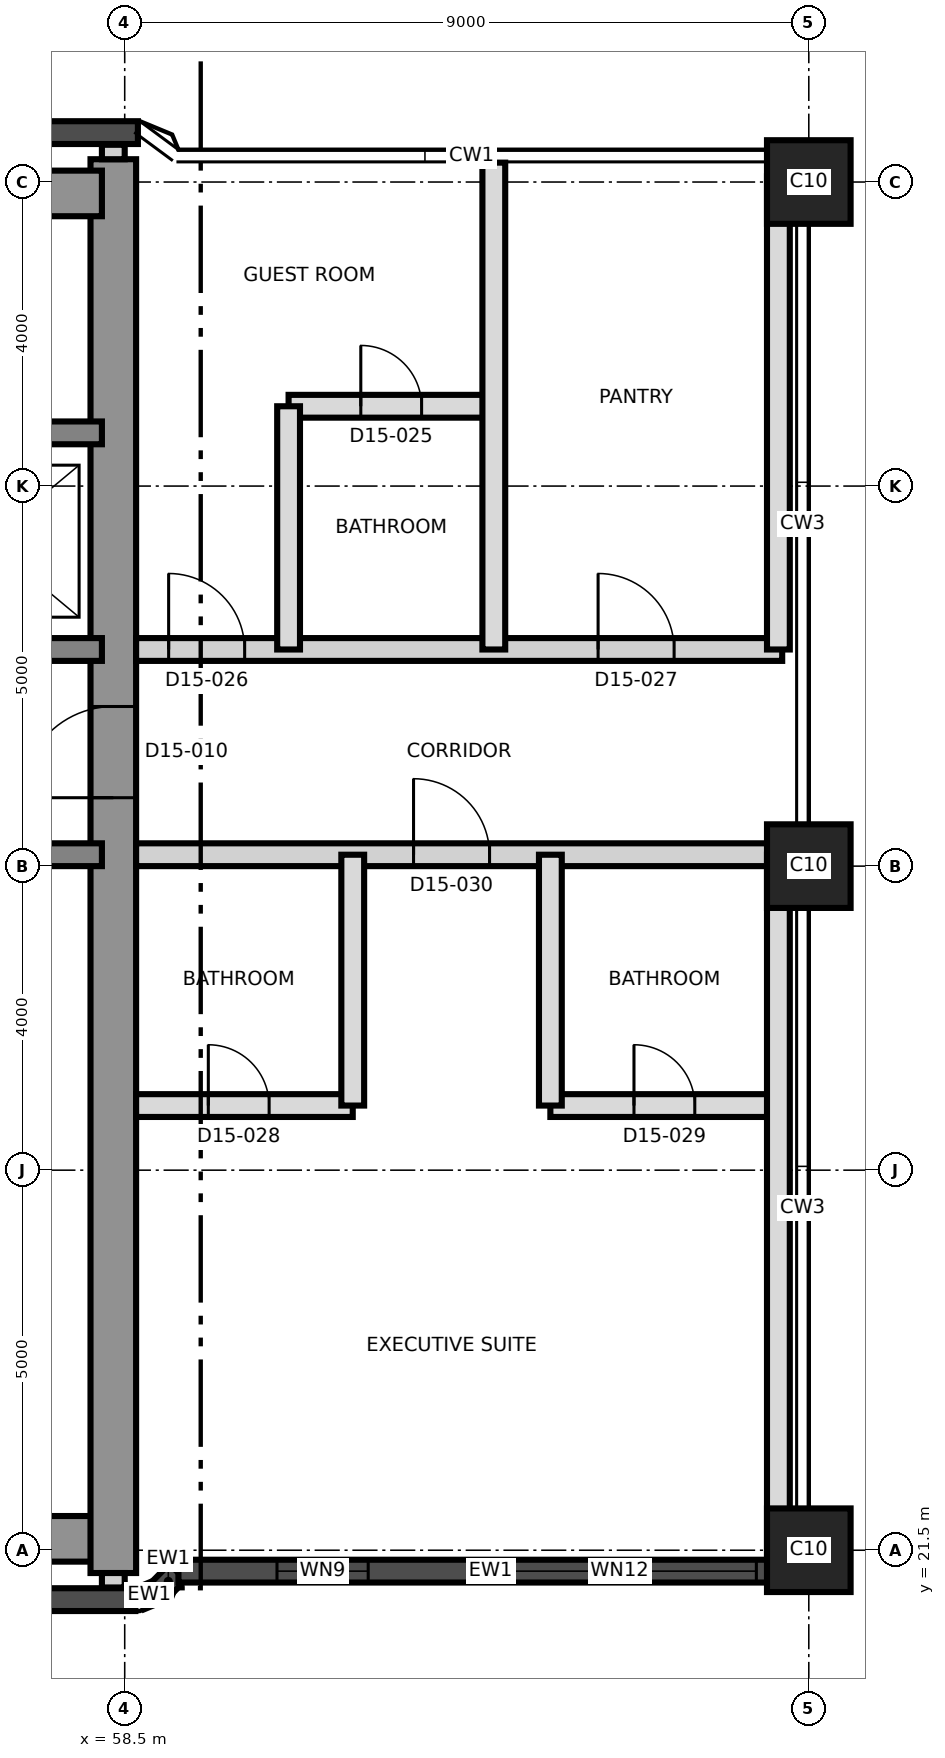
"""IFC4 building model, lengths in metres.
Left out: names, types, materials, properties, quantities, classifications, styles, units other than length and angle.
Written with IfcOpenShell. Run it as: python <this file> out.ifc"""

import sys

from ifc_helpers import new_model, si_unit, direction, frame, frame_2d, origin, origin_2d, place, context, subcontext, project, spatial, rectangle, extrude, element, fill, save


model = new_model("IFC4")
c1 = context("Model", 3, precision=1e-05, world=origin(), true_north=direction((0.0, 1.0)))
c2 = subcontext(c1, "Body", "Model", "MODEL_VIEW")
j1 = project(units=[si_unit("LENGTHUNIT", "METRE"), si_unit("PLANEANGLEUNIT", "RADIAN")], contexts=[c1])
p1 = place(None, origin())
s1 = spatial("IfcSite", under=j1, at=p1, CompositionType="ELEMENT")
p2 = place(p1, origin())
s2 = spatial("IfcBuilding", under=s1, at=p2, CompositionType="ELEMENT")
p3 = place(p2, frame((0.0, 0.0, 157.0)))
s3 = spatial("IfcBuildingStorey", under=s2, at=p3, CompositionType="ELEMENT", Elevation=157.0)
p4 = place(p3, frame((31.2, 21.65, 0.0), z_axis=(0.0, 0.0, 1.0), x_axis=(1.0, 0.0, 0.0)))
e1 = element("IfcWall", 1, at=p4, inside=s3, PredefinedType="SHEAR", context=c2, shape_type="SweptSolid", body=[
    extrude(rectangle(XDim=27.0, YDim=0.6, at=frame_2d((13.5, 0.0))), origin(), (0.0, 0.0, 1.0), 3.7),
])
p5 = place(p3, frame((58.35, 21.2, 0.0), z_axis=(0.0, 0.0, 1.0), x_axis=(0.0, 1.0, 0.0)))
e2 = element("IfcWall", 2, at=p5, inside=s3, PredefinedType="SHEAR", context=c2, shape_type="SweptSolid", body=[
    extrude(rectangle(XDim=18.6, YDim=0.6, at=frame_2d((9.3, 0.0))), origin(), (0.0, 0.0, 1.0), 3.7),
])
p6 = place(p5, frame((10.2, 0.0, 0.0)))
e3 = element("IfcOpeningElement", 3, at=p6, cuts=e2, PredefinedType="OPENING", context=c2, shape_type="SweptSolid", body=[
    extrude(rectangle(XDim=1.2, YDim=2.1, at=frame_2d((0.6, 1.05))), frame((0.0, 0.31, 0.0), z_axis=(0.0, -1.0, 0.0), x_axis=(1.0, 0.0, 0.0)), (0.0, 0.0, 1.0), 0.62),
])
p7 = place(p3, frame((31.2, 39.35, 0.0), z_axis=(0.0, 0.0, 1.0), x_axis=(1.0, 0.0, 0.0)))
e4 = element("IfcWall", 4, at=p7, inside=s3, PredefinedType="SHEAR", context=c2, shape_type="SweptSolid", body=[
    extrude(rectangle(XDim=27.0, YDim=0.6, at=frame_2d((13.5, 0.0))), origin(), (0.0, 0.0, 1.0), 3.7),
])
p8 = place(p7, frame((10.5, 0.0, 0.0)))
e5 = element("IfcOpeningElement", 5, at=p8, cuts=e4, PredefinedType="OPENING", context=c2, shape_type="SweptSolid", body=[
    extrude(rectangle(XDim=1.2, YDim=2.1, at=frame_2d((0.6, 1.05))), frame((0.0, 0.31, 0.0), z_axis=(0.0, -1.0, 0.0), x_axis=(1.0, 0.0, 0.0)), (0.0, 0.0, 1.0), 0.62),
])
p9 = place(p3, frame((31.8, 30.65, 0.0), z_axis=(0.0, 0.0, 1.0), x_axis=(1.0, 0.0, 0.0)))
e6 = element("IfcWall", 6, at=p9, inside=s3, PredefinedType="SHEAR", context=c2, shape_type="SweptSolid", body=[
    extrude(rectangle(XDim=26.4, YDim=0.3, at=frame_2d((13.2, 0.0))), origin(), (0.0, 0.0, 1.0), 3.7),
])
p10 = place(p9, frame((24.7, 0.0, 0.0)))
e7 = element("IfcOpeningElement", 7, at=p10, cuts=e6, PredefinedType="OPENING", context=c2, shape_type="SweptSolid", body=[
    extrude(rectangle(XDim=1.0, YDim=2.1, at=frame_2d((0.5, 1.05))), frame((0.0, 0.16, 0.0), z_axis=(0.0, -1.0, 0.0), x_axis=(1.0, 0.0, 0.0)), (0.0, 0.0, 1.0), 0.32),
])
p11 = place(p3, frame((31.8, 33.35, 0.0), z_axis=(0.0, 0.0, 1.0), x_axis=(1.0, 0.0, 0.0)))
e8 = element("IfcWall", 8, at=p11, inside=s3, PredefinedType="SHEAR", context=c2, shape_type="SweptSolid", body=[
    extrude(rectangle(XDim=26.4, YDim=0.3, at=frame_2d((13.2, 0.0))), origin(), (0.0, 0.0, 1.0), 3.7),
])
p12 = place(p11, frame((13.85, 0.0, 0.0)))
e9 = element("IfcOpeningElement", 9, at=p12, cuts=e8, PredefinedType="OPENING", context=c2, shape_type="SweptSolid", body=[
    extrude(rectangle(XDim=1.4, YDim=2.1, at=frame_2d((0.7, 1.05))), frame((0.0, 0.16, 0.0), z_axis=(0.0, -1.0, 0.0), x_axis=(1.0, 0.0, 0.0)), (0.0, 0.0, 1.0), 0.32),
])
p13 = place(p11, frame((5.325, 0.0, 0.0)))
e10 = element("IfcOpeningElement", 10, at=p13, cuts=e8, PredefinedType="OPENING", context=c2, shape_type="SweptSolid", body=[
    extrude(rectangle(XDim=1.2, YDim=2.1, at=frame_2d((0.6, 1.05))), frame((0.0, 0.16, 0.0), z_axis=(0.0, -1.0, 0.0), x_axis=(1.0, 0.0, 0.0)), (0.0, 0.0, 1.0), 0.32),
])
p14 = place(p11, frame((19.875, 0.0, 0.0)))
e11 = element("IfcOpeningElement", 11, at=p14, cuts=e8, PredefinedType="OPENING", context=c2, shape_type="SweptSolid", body=[
    extrude(rectangle(XDim=1.2, YDim=2.1, at=frame_2d((0.6, 1.05))), frame((0.0, 0.16, 0.0), z_axis=(0.0, -1.0, 0.0), x_axis=(1.0, 0.0, 0.0)), (0.0, 0.0, 1.0), 0.32),
])
p15 = place(p3, frame((43.5, 36.2, 0.0), z_axis=(0.0, 0.0, 1.0), x_axis=(1.0, 0.0, 0.0)))
e12 = element("IfcWall", 12, at=p15, inside=s3, PredefinedType="SHEAR", context=c2, shape_type="SweptSolid", body=[
    extrude(rectangle(XDim=14.7, YDim=0.3, at=frame_2d((7.35, 0.0))), origin(), (0.0, 0.0, 1.0), 3.7),
])
p16 = place(p15, frame((6.9, 0.0, 0.0)))
e13 = element("IfcOpeningElement", 13, at=p16, cuts=e12, PredefinedType="OPENING", context=c2, shape_type="SweptSolid", body=[
    extrude(rectangle(XDim=1.2, YDim=2.1, at=frame_2d((0.6, 1.05))), frame((0.0, 0.16, 0.0), z_axis=(0.0, -1.0, 0.0), x_axis=(1.0, 0.0, 0.0)), (0.0, 0.0, 1.0), 0.32),
])
p17 = place(p15, frame((0.7, 0.0, 0.0)))
e14 = element("IfcOpeningElement", 14, at=p17, cuts=e12, PredefinedType="OPENING", context=c2, shape_type="SweptSolid", body=[
    extrude(rectangle(XDim=1.3, YDim=2.4, at=frame_2d((0.65, 1.2))), frame((0.0, 0.16, 0.0), z_axis=(0.0, -1.0, 0.0), x_axis=(1.0, 0.0, 0.0)), (0.0, 0.0, 1.0), 0.32),
])
p18 = place(p15, frame((3.7, 0.0, 0.0)))
e15 = element("IfcOpeningElement", 15, at=p18, cuts=e12, PredefinedType="OPENING", context=c2, shape_type="SweptSolid", body=[
    extrude(rectangle(XDim=1.3, YDim=2.4, at=frame_2d((0.65, 1.2))), frame((0.0, 0.16, 0.0), z_axis=(0.0, -1.0, 0.0), x_axis=(1.0, 0.0, 0.0)), (0.0, 0.0, 1.0), 0.32),
])
for number, where, z_axis, x_axis in (
    (16, (67.5, 21.5, 0.0), (0.0, 0.0, 1.0), (1.0, 0.0, 0.0)),
    (17, (67.5, 30.5, 0.0), (0.0, 0.0, 1.0), (1.0, 0.0, 0.0)),
    (18, (67.5, 39.5, 0.0), (0.0, 0.0, 1.0), (1.0, 0.0, 0.0)),
):
    element("IfcColumn", number, at=place(p3, frame(where, z_axis=z_axis, x_axis=x_axis)), inside=s3, PredefinedType="COLUMN", context=c2, shape_type="SweptSolid", body=[
        extrude(rectangle(XDim=1.1, YDim=1.1, at=origin_2d()), origin(), (0.0, 0.0, 1.0), 3.7),
    ])
p19 = place(p3, frame((58.674, 40.15, 0.0), z_axis=(0.0, 0.0, 1.0), x_axis=(-1.0, 0.0, 0.0)))
e19 = element("IfcWall", 19, at=p19, inside=s3, PredefinedType="SOLIDWALL", context=c2, shape_type="SweptSolid", body=[
    extrude(rectangle(XDim=5.116, YDim=0.3, at=frame_2d((2.558, 0.0))), origin(), (0.0, 0.0, 1.0), 3.4),
])
p20 = place(p3, frame((31.36, 20.85, 0.0), z_axis=(0.0, 0.0, 1.0), x_axis=(1.0, 0.0, 0.0)))
e20 = element("IfcWall", 20, at=p20, inside=s3, PredefinedType="SOLIDWALL", context=c2, shape_type="SweptSolid", body=[
    extrude(rectangle(XDim=27.281, YDim=0.3, at=frame_2d((13.64, 0.0))), origin(), (0.0, 0.0, 1.0), 3.4),
])
p21 = place(p3, frame((58.698, 20.861, 0.0), z_axis=(0.0, 0.0, 1.0), x_axis=(0.923757413239, 0.38297812142, 0.0)))
e21 = element("IfcWall", 21, at=p21, inside=s3, PredefinedType="SOLIDWALL", context=c2, shape_type="SweptSolid", body=[
    extrude(rectangle(XDim=0.275, YDim=0.3, at=frame_2d((0.138, 0.0))), origin(), (0.0, 0.0, 1.0), 3.4),
])
p22 = place(p3, frame((58.952, 20.967, 0.0), z_axis=(0.0, 0.0, 1.0), x_axis=(0.702144810536, 0.712034174065, 0.0)))
e22 = element("IfcWall", 22, at=p22, inside=s3, PredefinedType="SOLIDWALL", context=c2, shape_type="SweptSolid", body=[
    extrude(rectangle(XDim=0.346, YDim=0.3, at=frame_2d((0.173, 0.0))), origin(), (0.0, 0.0, 1.0), 3.4),
])
p23 = place(p3, frame((59.207, 21.225, 0.0), z_axis=(0.0, 0.0, 1.0), x_axis=(1.0, 0.0, 0.0)))
e23 = element("IfcWall", 23, at=p23, inside=s3, PredefinedType="SOLIDWALL", context=c2, shape_type="SweptSolid", body=[
    extrude(rectangle(XDim=8.213, YDim=0.3, at=frame_2d((4.106, 0.0))), origin(), (0.0, 0.0, 1.0), 3.4),
])
p24 = place(p23, frame((1.297, 0.0, 0.9)))
e24 = element("IfcOpeningElement", 24, at=p24, cuts=e23, PredefinedType="OPENING", context=c2, shape_type="SweptSolid", body=[
    extrude(rectangle(XDim=1.2, YDim=1.5, at=frame_2d((0.6, 0.75))), frame((0.0, 0.16, 0.0), z_axis=(0.0, -1.0, 0.0), x_axis=(1.0, 0.0, 0.0)), (0.0, 0.0, 1.0), 0.32),
])
p25 = place(p23, frame((4.003, 0.0, 0.9)))
e25 = element("IfcOpeningElement", 25, at=p25, cuts=e23, PredefinedType="OPENING", context=c2, shape_type="SweptSolid", body=[
    extrude(rectangle(XDim=3.6, YDim=1.5, at=frame_2d((1.8, 0.75))), frame((0.0, 0.16, 0.0), z_axis=(0.0, -1.0, 0.0), x_axis=(1.0, 0.0, 0.0)), (0.0, 0.0, 1.0), 0.32),
])
p26 = place(p3, frame((58.65, 27.35, 0.0), z_axis=(0.0, 0.0, 1.0), x_axis=(1.0, 0.0, 0.0)))
e26 = element("IfcWall", 26, at=p26, inside=s3, PredefinedType="PARTITIONING", context=c2, shape_type="SweptSolid", body=[
    extrude(rectangle(XDim=2.85, YDim=0.3, at=frame_2d((1.425, 0.0))), origin(), (0.0, 0.0, 1.0), 3.4),
])
p27 = place(p26, frame((0.95, 0.0, 0.0)))
e27 = element("IfcOpeningElement", 27, at=p27, cuts=e26, PredefinedType="OPENING", context=c2, shape_type="SweptSolid", body=[
    extrude(rectangle(XDim=0.8, YDim=2.1, at=frame_2d((0.4, 1.05))), frame((0.0, 0.16, 0.0), z_axis=(0.0, -1.0, 0.0), x_axis=(1.0, 0.0, 0.0)), (0.0, 0.0, 1.0), 0.32),
])
p28 = place(p3, frame((64.1, 27.35, 0.0), z_axis=(0.0, 0.0, 1.0), x_axis=(1.0, 0.0, 0.0)))
e28 = element("IfcWall", 28, at=p28, inside=s3, PredefinedType="PARTITIONING", context=c2, shape_type="SweptSolid", body=[
    extrude(rectangle(XDim=3.0, YDim=0.3, at=frame_2d((1.5, 0.0))), origin(), (0.0, 0.0, 1.0), 3.4),
])
p29 = place(p28, frame((1.1, 0.0, 0.0)))
e29 = element("IfcOpeningElement", 29, at=p29, cuts=e28, PredefinedType="OPENING", context=c2, shape_type="SweptSolid", body=[
    extrude(rectangle(XDim=0.8, YDim=2.1, at=frame_2d((0.4, 1.05))), frame((0.0, 0.16, 0.0), z_axis=(0.0, -1.0, 0.0), x_axis=(1.0, 0.0, 0.0)), (0.0, 0.0, 1.0), 0.32),
])
p30 = place(p3, frame((58.65, 30.65, 0.0), z_axis=(0.0, 0.0, 1.0), x_axis=(1.0, 0.0, 0.0)))
e30 = element("IfcWall", 30, at=p30, inside=s3, PredefinedType="PARTITIONING", context=c2, shape_type="SweptSolid", body=[
    extrude(rectangle(XDim=8.5, YDim=0.3, at=frame_2d((4.25, 0.0))), origin(), (0.0, 0.0, 1.0), 3.4),
])
p31 = place(p30, frame((3.65, 0.0, 0.0)))
e31 = element("IfcOpeningElement", 31, at=p31, cuts=e30, PredefinedType="OPENING", context=c2, shape_type="SweptSolid", body=[
    extrude(rectangle(XDim=1.0, YDim=2.4, at=frame_2d((0.5, 1.2))), frame((0.0, 0.16, 0.0), z_axis=(0.0, -1.0, 0.0), x_axis=(1.0, 0.0, 0.0)), (0.0, 0.0, 1.0), 0.32),
])
p32 = place(p3, frame((58.65, 33.35, 0.0), z_axis=(0.0, 0.0, 1.0), x_axis=(1.0, 0.0, 0.0)))
e32 = element("IfcWall", 32, at=p32, inside=s3, PredefinedType="PARTITIONING", context=c2, shape_type="SweptSolid", body=[
    extrude(rectangle(XDim=8.5, YDim=0.3, at=frame_2d((4.25, 0.0))), origin(), (0.0, 0.0, 1.0), 3.4),
])
p33 = place(p32, frame((0.428, 0.0, 0.0)))
e33 = element("IfcOpeningElement", 33, at=p33, cuts=e32, PredefinedType="OPENING", context=c2, shape_type="SweptSolid", body=[
    extrude(rectangle(XDim=1.0, YDim=2.1, at=frame_2d((0.5, 1.05))), frame((0.0, 0.16, 0.0), z_axis=(0.0, -1.0, 0.0), x_axis=(1.0, 0.0, 0.0)), (0.0, 0.0, 1.0), 0.32),
])
p34 = place(p32, frame((6.078, 0.0, 0.0)))
e34 = element("IfcOpeningElement", 34, at=p34, cuts=e32, PredefinedType="OPENING", context=c2, shape_type="SweptSolid", body=[
    extrude(rectangle(XDim=1.0, YDim=2.1, at=frame_2d((0.5, 1.05))), frame((0.0, 0.16, 0.0), z_axis=(0.0, -1.0, 0.0), x_axis=(1.0, 0.0, 0.0)), (0.0, 0.0, 1.0), 0.32),
])
p35 = place(p3, frame((60.656, 36.55, 0.0), z_axis=(0.0, 0.0, 1.0), x_axis=(1.0, 0.0, 0.0)))
e35 = element("IfcWall", 35, at=p35, inside=s3, PredefinedType="PARTITIONING", context=c2, shape_type="SweptSolid", body=[
    extrude(rectangle(XDim=2.7, YDim=0.3, at=frame_2d((1.35, 0.0))), origin(), (0.0, 0.0, 1.0), 3.4),
])
p36 = place(p35, frame((0.95, 0.0, 0.0)))
e36 = element("IfcOpeningElement", 36, at=p36, cuts=e35, PredefinedType="OPENING", context=c2, shape_type="SweptSolid", body=[
    extrude(rectangle(XDim=0.8, YDim=2.1, at=frame_2d((0.4, 1.05))), frame((0.0, 0.16, 0.0), z_axis=(0.0, -1.0, 0.0), x_axis=(1.0, 0.0, 0.0)), (0.0, 0.0, 1.0), 0.32),
])
p37 = place(p3, frame((60.656, 33.35, 0.0), z_axis=(0.0, 0.0, 1.0), x_axis=(0.0, 1.0, 0.0)))
e37 = element("IfcWall", 37, at=p37, inside=s3, PredefinedType="PARTITIONING", context=c2, shape_type="SweptSolid", body=[
    extrude(rectangle(XDim=3.2, YDim=0.3, at=frame_2d((1.6, 0.0))), origin(), (0.0, 0.0, 1.0), 3.4),
])
p38 = place(p3, frame((61.5, 27.35, 0.0), z_axis=(0.0, 0.0, 1.0), x_axis=(0.0, 1.0, 0.0)))
e38 = element("IfcWall", 38, at=p38, inside=s3, PredefinedType="PARTITIONING", context=c2, shape_type="SweptSolid", body=[
    extrude(rectangle(XDim=3.3, YDim=0.3, at=frame_2d((1.65, 0.0))), origin(), (0.0, 0.0, 1.0), 3.4),
])
p39 = place(p3, frame((63.356, 33.35, 0.0), z_axis=(0.0, 0.0, 1.0), x_axis=(0.0, 1.0, 0.0)))
e39 = element("IfcWall", 39, at=p39, inside=s3, PredefinedType="PARTITIONING", context=c2, shape_type="SweptSolid", body=[
    extrude(rectangle(XDim=6.405, YDim=0.3, at=frame_2d((3.202, 0.0))), origin(), (0.0, 0.0, 1.0), 3.4),
])
p40 = place(p3, frame((64.1, 27.35, 0.0), z_axis=(0.0, 0.0, 1.0), x_axis=(0.0, 1.0, 0.0)))
e40 = element("IfcWall", 40, at=p40, inside=s3, PredefinedType="PARTITIONING", context=c2, shape_type="SweptSolid", body=[
    extrude(rectangle(XDim=3.3, YDim=0.3, at=frame_2d((1.65, 0.0))), origin(), (0.0, 0.0, 1.0), 3.4),
])
p41 = place(p3, frame((67.1, 21.425, 0.0), z_axis=(0.0, 0.0, 1.0), x_axis=(0.0, 1.0, 0.0)))
e41 = element("IfcWall", 41, at=p41, inside=s3, PredefinedType="PARTITIONING", context=c2, shape_type="SweptSolid", body=[
    extrude(rectangle(XDim=9.225, YDim=0.3, at=frame_2d((4.612, 0.0))), origin(), (0.0, 0.0, 1.0), 3.4),
])
p42 = place(p3, frame((67.1, 33.35, 0.0), z_axis=(0.0, 0.0, 1.0), x_axis=(0.0, 1.0, 0.0)))
e42 = element("IfcWall", 42, at=p42, inside=s3, PredefinedType="PARTITIONING", context=c2, shape_type="SweptSolid", body=[
    extrude(rectangle(XDim=6.225, YDim=0.3, at=frame_2d((3.112, 0.0))), origin(), (0.0, 0.0, 1.0), 3.4),
])
for number, where, z_axis, x_axis in (
    (43, (58.35, 21.2, 0.0), (0.0, 0.0, 1.0), (0.0, -1.0, 0.0)),
    (44, (58.35, 39.8, 0.0), (0.0, 0.0, 1.0), (0.0, 1.0, 0.0)),
):
    element("IfcWall", number, at=place(p3, frame(where, z_axis=z_axis, x_axis=x_axis)), inside=s3, PredefinedType="PARTITIONING", context=c2, shape_type="SweptSolid", body=[
        extrude(rectangle(XDim=0.19, YDim=0.3, at=frame_2d((0.095, 0.0))), origin(), (0.0, 0.0, 1.0), 3.4),
    ])
p43 = place(p24, origin())
e45 = element("IfcWindow", 45, at=p43, inside=s3, PartitioningType="SINGLE_PANEL", PredefinedType="WINDOW", context=c2, shape_type="SweptSolid", body=[
    extrude(rectangle(XDim=1.2, YDim=1.5, at=frame_2d((0.6, 0.75))), frame((0.0, 0.03, 0.0), z_axis=(0.0, -1.0, 0.0), x_axis=(1.0, 0.0, 0.0)), (0.0, 0.0, 1.0), 0.06),
])
fill(e24, e45)
p44 = place(p25, origin())
e46 = element("IfcWindow", 46, at=p44, inside=s3, PartitioningType="SINGLE_PANEL", PredefinedType="WINDOW", context=c2, shape_type="SweptSolid", body=[
    extrude(rectangle(XDim=3.6, YDim=1.5, at=frame_2d((1.8, 0.75))), frame((0.0, 0.03, 0.0), z_axis=(0.0, -1.0, 0.0), x_axis=(1.0, 0.0, 0.0)), (0.0, 0.0, 1.0), 0.06),
])
fill(e25, e46)
p45 = place(p6, origin())
e47 = element("IfcDoor", 47, at=p45, inside=s3, OperationType="SINGLE_SWING_LEFT", PredefinedType="DOOR", context=c2, shape_type="SweptSolid", body=[
    extrude(rectangle(XDim=1.2, YDim=2.1, at=frame_2d((0.6, 1.05))), frame((0.0, 0.025, 0.0), z_axis=(0.0, -1.0, 0.0), x_axis=(1.0, 0.0, 0.0)), (0.0, 0.0, 1.0), 0.05),
])
fill(e3, e47)
p46 = place(p36, origin())
e48 = element("IfcDoor", 48, at=p46, inside=s3, OperationType="SINGLE_SWING_LEFT", PredefinedType="DOOR", context=c2, shape_type="SweptSolid", body=[
    extrude(rectangle(XDim=0.8, YDim=2.1, at=frame_2d((0.4, 1.05))), frame((0.0, 0.025, 0.0), z_axis=(0.0, -1.0, 0.0), x_axis=(1.0, 0.0, 0.0)), (0.0, 0.0, 1.0), 0.05),
])
fill(e36, e48)
p47 = place(p33, origin())
e49 = element("IfcDoor", 49, at=p47, inside=s3, OperationType="SINGLE_SWING_LEFT", PredefinedType="DOOR", context=c2, shape_type="SweptSolid", body=[
    extrude(rectangle(XDim=1.0, YDim=2.1, at=frame_2d((0.5, 1.05))), frame((0.0, 0.025, 0.0), z_axis=(0.0, -1.0, 0.0), x_axis=(1.0, 0.0, 0.0)), (0.0, 0.0, 1.0), 0.05),
])
fill(e33, e49)
p48 = place(p34, origin())
e50 = element("IfcDoor", 50, at=p48, inside=s3, OperationType="SINGLE_SWING_RIGHT", PredefinedType="DOOR", context=c2, shape_type="SweptSolid", body=[
    extrude(rectangle(XDim=1.0, YDim=2.1, at=frame_2d((0.5, 1.05))), frame((0.0, 0.025, 0.0), z_axis=(0.0, -1.0, 0.0), x_axis=(1.0, 0.0, 0.0)), (0.0, 0.0, 1.0), 0.05),
])
fill(e34, e50)
p49 = place(p27, origin())
e51 = element("IfcDoor", 51, at=p49, inside=s3, OperationType="SINGLE_SWING_LEFT", PredefinedType="DOOR", context=c2, shape_type="SweptSolid", body=[
    extrude(rectangle(XDim=0.8, YDim=2.1, at=frame_2d((0.4, 1.05))), frame((0.0, 0.025, 0.0), z_axis=(0.0, -1.0, 0.0), x_axis=(1.0, 0.0, 0.0)), (0.0, 0.0, 1.0), 0.05),
])
fill(e27, e51)
p50 = place(p29, origin())
e52 = element("IfcDoor", 52, at=p50, inside=s3, OperationType="SINGLE_SWING_RIGHT", PredefinedType="DOOR", context=c2, shape_type="SweptSolid", body=[
    extrude(rectangle(XDim=0.8, YDim=2.1, at=frame_2d((0.4, 1.05))), frame((0.0, 0.025, 0.0), z_axis=(0.0, -1.0, 0.0), x_axis=(1.0, 0.0, 0.0)), (0.0, 0.0, 1.0), 0.05),
])
fill(e29, e52)
p51 = place(p31, origin())
e53 = element("IfcDoor", 53, at=p51, inside=s3, OperationType="SINGLE_SWING_LEFT", PredefinedType="DOOR", context=c2, shape_type="SweptSolid", body=[
    extrude(rectangle(XDim=1.0, YDim=2.4, at=frame_2d((0.5, 1.2))), frame((0.0, 0.025, 0.0), z_axis=(0.0, -1.0, 0.0), x_axis=(1.0, 0.0, 0.0)), (0.0, 0.0, 1.0), 0.05),
])
fill(e31, e53)
save(model, sys.argv[1])
